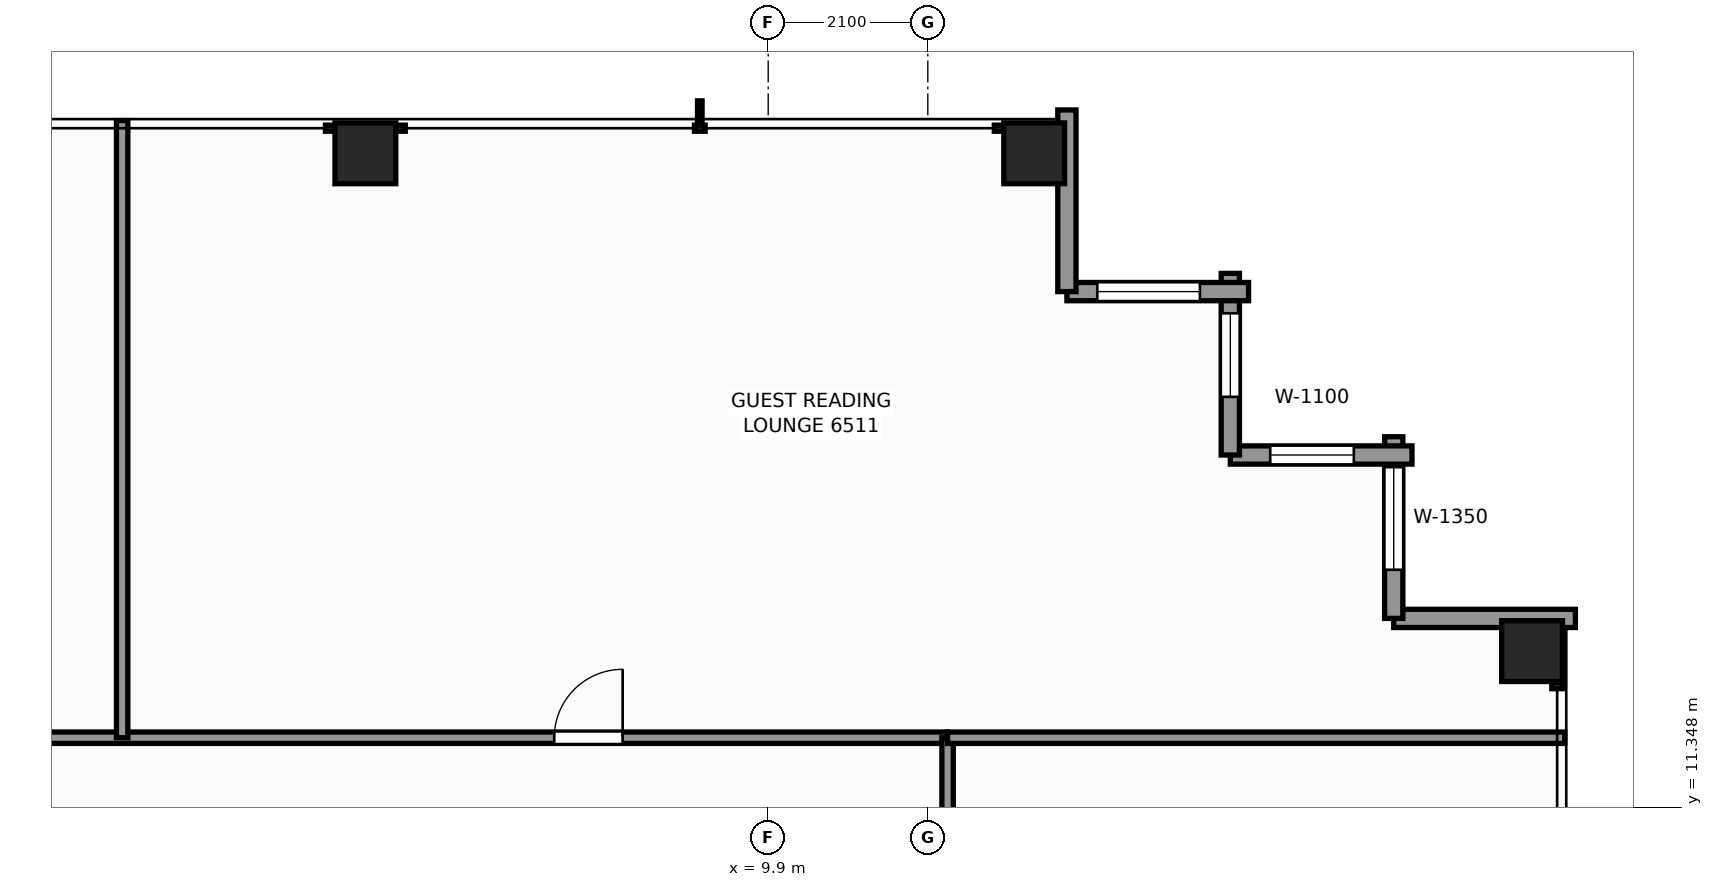
"""IFC4 building model, lengths in metres.
Left out: names, types, materials, properties, quantities, classifications, styles, units other than length and angle.
Written with IfcOpenShell. Run it as: python <this file> out.ifc"""

import sys

from ifc_helpers import new_model, si_unit, direction, frame, frame_2d, origin, origin_2d, place, context, subcontext, project, spatial, rectangle, extrude, element, fill, save


model = new_model("IFC4")
c1 = context("Model", 3, precision=1e-05, world=origin(), true_north=direction((0.0, 1.0)))
c2 = subcontext(c1, "Body", "Model", "MODEL_VIEW")
j1 = project(units=[si_unit("LENGTHUNIT", "METRE"), si_unit("PLANEANGLEUNIT", "RADIAN")], contexts=[c1])
p1 = place(None, origin())
s1 = spatial("IfcSite", under=j1, at=p1, CompositionType="ELEMENT")
p2 = place(p1, origin())
s2 = spatial("IfcBuilding", under=s1, at=p2, CompositionType="ELEMENT")
p3 = place(p2, frame((0.0, 0.0, 222.9)))
s3 = spatial("IfcBuildingStorey", under=s2, at=p3, CompositionType="ELEMENT", Elevation=222.9)
for number, where, z_axis, x_axis in (
    (1, (4.6, 19.95, 0.0), (0.0, 0.0, 1.0), (1.0, 0.0, 0.0)),
    (2, (13.4, 19.95, 0.0), (0.0, 0.0, 1.0), (1.0, 0.0, 0.0)),
    (3, (19.95, 13.4, 0.0), (0.0, 0.0, 1.0), (1.0, 0.0, 0.0)),
):
    element("IfcColumn", number, at=place(p3, frame(where, z_axis=z_axis, x_axis=x_axis)), inside=s3, PredefinedType="COLUMN", context=c2, shape_type="SweptSolid", body=[
        extrude(rectangle(XDim=0.8, YDim=0.8, at=origin_2d()), origin(), (0.0, 0.0, 1.0), 3.3),
    ])
p4 = place(p3, frame((18.13, 13.83, 0.0), z_axis=(0.0, 0.0, 1.0), x_axis=(1.0, 0.0, 0.0)))
e4 = element("IfcWall", 4, at=p4, inside=s3, PredefinedType="STANDARD", context=c2, shape_type="SweptSolid", body=[
    extrude(rectangle(XDim=2.39, YDim=0.24, at=frame_2d((1.195, 0.0))), origin(), (0.0, 0.0, 1.0), 2.463),
])
p5 = place(p3, frame((18.13, 16.22, 0.0), z_axis=(0.0, 0.0, 1.0), x_axis=(0.0, -1.0, 0.0)))
e5 = element("IfcWall", 5, at=p5, inside=s3, PredefinedType="STANDARD", context=c2, shape_type="SweptSolid", body=[
    extrude(rectangle(XDim=2.39, YDim=0.24, at=frame_2d((1.195, 0.0))), origin(), (0.0, 0.0, 1.0), 2.463),
])
p6 = place(p5, frame((0.4, 0.0, 0.65)))
e6 = element("IfcOpeningElement", 6, at=p6, cuts=e5, PredefinedType="OPENING", context=c2, shape_type="SweptSolid", body=[
    extrude(rectangle(XDim=1.35, YDim=1.55, at=frame_2d((0.675, 0.775))), frame((0.0, 0.13, 0.0), z_axis=(0.0, -1.0, 0.0), x_axis=(1.0, 0.0, 0.0)), (0.0, 0.0, 1.0), 0.26),
])
p7 = place(p3, frame((15.98, 15.98, 0.0), z_axis=(0.0, 0.0, 1.0), x_axis=(1.0, 0.0, 0.0)))
e7 = element("IfcWall", 7, at=p7, inside=s3, PredefinedType="STANDARD", context=c2, shape_type="SweptSolid", body=[
    extrude(rectangle(XDim=2.39, YDim=0.24, at=frame_2d((1.195, 0.0))), origin(), (0.0, 0.0, 1.0), 2.463),
])
p8 = place(p7, frame((0.525, 0.0, 0.65)))
e8 = element("IfcOpeningElement", 8, at=p8, cuts=e7, PredefinedType="OPENING", context=c2, shape_type="SweptSolid", body=[
    extrude(rectangle(XDim=1.1, YDim=1.45, at=frame_2d((0.55, 0.725))), frame((0.0, 0.13, 0.0), z_axis=(0.0, -1.0, 0.0), x_axis=(1.0, 0.0, 0.0)), (0.0, 0.0, 1.0), 0.26),
])
p9 = place(p3, frame((15.98, 18.37, 0.0), z_axis=(0.0, 0.0, 1.0), x_axis=(0.0, -1.0, 0.0)))
e9 = element("IfcWall", 9, at=p9, inside=s3, PredefinedType="STANDARD", context=c2, shape_type="SweptSolid", body=[
    extrude(rectangle(XDim=2.39, YDim=0.24, at=frame_2d((1.195, 0.0))), origin(), (0.0, 0.0, 1.0), 2.463),
])
p10 = place(p9, frame((0.525, 0.0, 0.65)))
e10 = element("IfcOpeningElement", 10, at=p10, cuts=e9, PredefinedType="OPENING", context=c2, shape_type="SweptSolid", body=[
    extrude(rectangle(XDim=1.1, YDim=1.45, at=frame_2d((0.55, 0.725))), frame((0.0, 0.13, 0.0), z_axis=(0.0, -1.0, 0.0), x_axis=(1.0, 0.0, 0.0)), (0.0, 0.0, 1.0), 0.26),
])
p11 = place(p3, frame((13.83, 18.13, 0.0), z_axis=(0.0, 0.0, 1.0), x_axis=(1.0, 0.0, 0.0)))
e11 = element("IfcWall", 11, at=p11, inside=s3, PredefinedType="STANDARD", context=c2, shape_type="SweptSolid", body=[
    extrude(rectangle(XDim=2.39, YDim=0.24, at=frame_2d((1.195, 0.0))), origin(), (0.0, 0.0, 1.0), 2.463),
])
p12 = place(p11, frame((0.4, 0.0, 0.65)))
e12 = element("IfcOpeningElement", 12, at=p12, cuts=e11, PredefinedType="OPENING", context=c2, shape_type="SweptSolid", body=[
    extrude(rectangle(XDim=1.35, YDim=1.55, at=frame_2d((0.675, 0.775))), frame((0.0, 0.13, 0.0), z_axis=(0.0, -1.0, 0.0), x_axis=(1.0, 0.0, 0.0)), (0.0, 0.0, 1.0), 0.26),
])
p13 = place(p3, frame((13.83, 20.52, 0.0), z_axis=(0.0, 0.0, 1.0), x_axis=(0.0, -1.0, 0.0)))
e13 = element("IfcWall", 13, at=p13, inside=s3, PredefinedType="STANDARD", context=c2, shape_type="SweptSolid", body=[
    extrude(rectangle(XDim=2.39, YDim=0.24, at=frame_2d((1.195, 0.0))), origin(), (0.0, 0.0, 1.0), 2.463),
])
p14 = place(p3, frame((-12.26, 12.26, 0.0), z_axis=(0.0, 0.0, 1.0), x_axis=(1.0, 0.0, 0.0)))
e14 = element("IfcWall", 14, at=p14, inside=s3, PredefinedType="PARTITIONING", context=c2, shape_type="SweptSolid", body=[
    extrude(rectangle(XDim=24.52, YDim=0.15, at=frame_2d((12.26, 0.0))), origin(), (0.0, 0.0, 1.0), 2.369),
])
p15 = place(p14, frame((2.916, 0.0, 0.0)))
e15 = element("IfcOpeningElement", 15, at=p15, cuts=e14, PredefinedType="OPENING", context=c2, shape_type="SweptSolid", body=[
    extrude(rectangle(XDim=0.9, YDim=2.06, at=frame_2d((0.45, 1.03))), frame((0.0, 0.085, 0.0), z_axis=(0.0, -1.0, 0.0), x_axis=(1.0, 0.0, 0.0)), (0.0, 0.0, 1.0), 0.17),
])
p16 = place(p14, frame((9.755, 0.0, 0.0)))
e16 = element("IfcOpeningElement", 16, at=p16, cuts=e14, PredefinedType="OPENING", context=c2, shape_type="SweptSolid", body=[
    extrude(rectangle(XDim=0.95, YDim=2.06, at=frame_2d((0.475, 1.03))), frame((0.0, 0.085, 0.0), z_axis=(0.0, -1.0, 0.0), x_axis=(1.0, 0.0, 0.0)), (0.0, 0.0, 1.0), 0.17),
])
p17 = place(p14, frame((19.345, 0.0, 0.0)))
e17 = element("IfcOpeningElement", 17, at=p17, cuts=e14, PredefinedType="OPENING", context=c2, shape_type="SweptSolid", body=[
    extrude(rectangle(XDim=0.9, YDim=2.06, at=frame_2d((0.45, 1.03))), frame((0.0, 0.085, 0.0), z_axis=(0.0, -1.0, 0.0), x_axis=(1.0, 0.0, 0.0)), (0.0, 0.0, 1.0), 0.17),
])
p18 = place(p3, frame((12.26, -12.58, 0.0), z_axis=(0.0, 0.0, 1.0), x_axis=(0.0, 1.0, 0.0)))
e18 = element("IfcWall", 18, at=p18, inside=s3, PredefinedType="PARTITIONING", context=c2, shape_type="SweptSolid", body=[
    extrude(rectangle(XDim=24.84, YDim=0.15, at=frame_2d((12.42, 0.0))), origin(), (0.0, 0.0, 1.0), 2.369),
])
p19 = place(p18, frame((4.595, 0.0, 0.0)))
e19 = element("IfcOpeningElement", 19, at=p19, cuts=e18, PredefinedType="OPENING", context=c2, shape_type="SweptSolid", body=[
    extrude(rectangle(XDim=0.9, YDim=2.06, at=frame_2d((0.45, 1.03))), frame((0.0, 0.085, 0.0), z_axis=(0.0, -1.0, 0.0), x_axis=(1.0, 0.0, 0.0)), (0.0, 0.0, 1.0), 0.17),
])
p20 = place(p18, frame((19.665, 0.0, 0.0)))
e20 = element("IfcOpeningElement", 20, at=p20, cuts=e18, PredefinedType="OPENING", context=c2, shape_type="SweptSolid", body=[
    extrude(rectangle(XDim=0.9, YDim=2.06, at=frame_2d((0.45, 1.03))), frame((0.0, 0.085, 0.0), z_axis=(0.0, -1.0, 0.0), x_axis=(1.0, 0.0, 0.0)), (0.0, 0.0, 1.0), 0.17),
])
p21 = place(p3, frame((12.26, 12.26, 0.0), z_axis=(0.0, 0.0, 1.0), x_axis=(1.0, 0.0, 0.0)))
e21 = element("IfcWall", 21, at=p21, inside=s3, PredefinedType="PARTITIONING", context=c2, shape_type="SweptSolid", body=[
    extrude(rectangle(XDim=8.12, YDim=0.15, at=frame_2d((4.06, 0.0))), origin(), (0.0, 0.0, 1.0), 2.369),
])
p22 = place(p3, frame((1.4, 12.26, 0.0), z_axis=(0.0, 0.0, 1.0), x_axis=(0.0, 1.0, 0.0)))
e22 = element("IfcWall", 22, at=p22, inside=s3, PredefinedType="PARTITIONING", context=c2, shape_type="SweptSolid", body=[
    extrude(rectangle(XDim=8.12, YDim=0.15, at=frame_2d((4.06, 0.0))), origin(), (0.0, 0.0, 1.0), 2.453),
])
p23 = place(p6, origin())
e23 = element("IfcWindow", 23, at=p23, inside=s3, PartitioningType="SINGLE_PANEL", PredefinedType="WINDOW", context=c2, shape_type="SweptSolid", body=[
    extrude(rectangle(XDim=1.35, YDim=1.55, at=frame_2d((0.675, 0.775))), frame((0.0, 0.03, 0.0), z_axis=(0.0, -1.0, 0.0), x_axis=(1.0, 0.0, 0.0)), (0.0, 0.0, 1.0), 0.06),
])
fill(e6, e23)
p24 = place(p8, origin())
e24 = element("IfcWindow", 24, at=p24, inside=s3, PartitioningType="SINGLE_PANEL", PredefinedType="WINDOW", context=c2, shape_type="SweptSolid", body=[
    extrude(rectangle(XDim=1.1, YDim=1.45, at=frame_2d((0.55, 0.725))), frame((0.0, 0.03, 0.0), z_axis=(0.0, -1.0, 0.0), x_axis=(1.0, 0.0, 0.0)), (0.0, 0.0, 1.0), 0.06),
])
fill(e8, e24)
p25 = place(p10, origin())
e25 = element("IfcWindow", 25, at=p25, inside=s3, PartitioningType="SINGLE_PANEL", PredefinedType="WINDOW", context=c2, shape_type="SweptSolid", body=[
    extrude(rectangle(XDim=1.1, YDim=1.45, at=frame_2d((0.55, 0.725))), frame((0.0, 0.03, 0.0), z_axis=(0.0, -1.0, 0.0), x_axis=(1.0, 0.0, 0.0)), (0.0, 0.0, 1.0), 0.06),
])
fill(e10, e25)
p26 = place(p12, origin())
e26 = element("IfcWindow", 26, at=p26, inside=s3, PartitioningType="SINGLE_PANEL", PredefinedType="WINDOW", context=c2, shape_type="SweptSolid", body=[
    extrude(rectangle(XDim=1.35, YDim=1.55, at=frame_2d((0.675, 0.775))), frame((0.0, 0.03, 0.0), z_axis=(0.0, -1.0, 0.0), x_axis=(1.0, 0.0, 0.0)), (0.0, 0.0, 1.0), 0.06),
])
fill(e12, e26)
p27 = place(p17, origin())
e27 = element("IfcDoor", 27, at=p27, inside=s3, OperationType="SINGLE_SWING_RIGHT", PredefinedType="DOOR", context=c2, shape_type="SweptSolid", body=[
    extrude(rectangle(XDim=0.9, YDim=2.06, at=frame_2d((0.45, 1.03))), frame((0.0, 0.025, 0.0), z_axis=(0.0, -1.0, 0.0), x_axis=(1.0, 0.0, 0.0)), (0.0, 0.0, 1.0), 0.05),
])
fill(e17, e27)
save(model, sys.argv[1])
